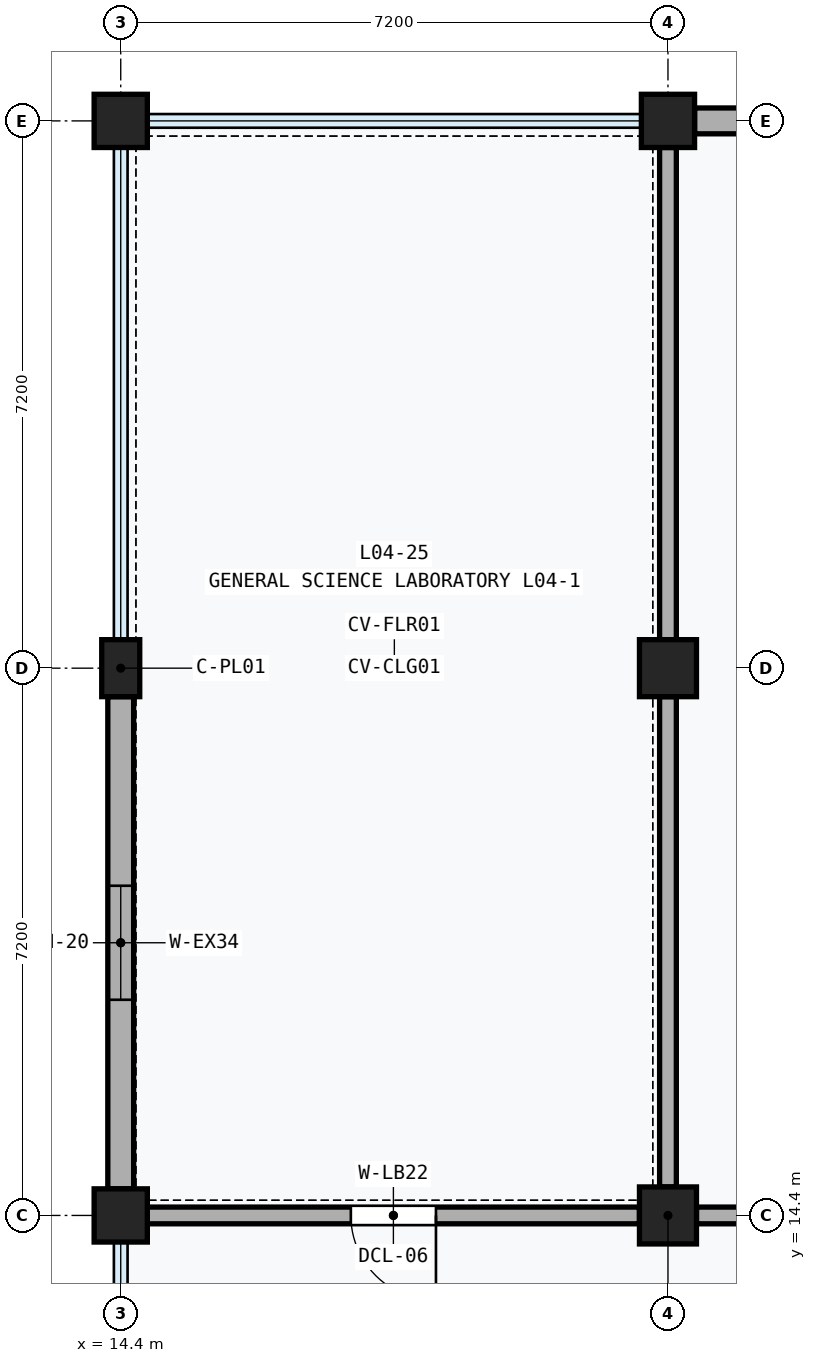
"""IFC4 building model, lengths in metres.
Left out: names, types, materials, properties, quantities, classifications, styles, units other than length and angle.
Written with IfcOpenShell. Run it as: python <this file> out.ifc"""

import sys

from ifc_helpers import new_model, si_unit, direction, frame, frame_2d, origin, origin_2d, place, context, subcontext, project, spatial, rectangle, extrude, element, fill, save


model = new_model("IFC4")
c1 = context("Model", 3, precision=1e-05, world=origin(), true_north=direction((0.0, 1.0)))
c2 = subcontext(c1, "Body", "Model", "MODEL_VIEW")
j1 = project(units=[si_unit("LENGTHUNIT", "METRE"), si_unit("PLANEANGLEUNIT", "RADIAN")], contexts=[c1])
p1 = place(None, origin())
s1 = spatial("IfcSite", under=j1, at=p1, CompositionType="ELEMENT")
p2 = place(p1, origin())
s2 = spatial("IfcBuilding", under=s1, at=p2, CompositionType="ELEMENT")
p3 = place(p2, frame((0.0, 0.0, 18.6)))
s3 = spatial("IfcBuildingStorey", under=s2, at=p3, CompositionType="ELEMENT", Elevation=18.6)
p4 = place(p3, frame((14.4, 14.4, 0.0), z_axis=(0.0, 0.0, 1.0), x_axis=(1.0, 0.0, 0.0)))
e1 = element("IfcColumn", 1, at=p4, inside=s3, PredefinedType="COLUMN", context=c2, shape_type="SweptSolid", body=[
    extrude(rectangle(XDim=0.7, YDim=0.7, at=origin_2d()), origin(), (0.0, 0.0, 1.0), 4.0),
])
p5 = place(p3, frame((14.4, 21.6, 0.0), z_axis=(0.0, 0.0, 1.0), x_axis=(1.0, 0.0, 0.0)))
e2 = element("IfcColumn", 2, at=p5, inside=s3, PredefinedType="PILASTER", context=c2, shape_type="SweptSolid", body=[
    extrude(rectangle(XDim=0.5, YDim=0.75, at=origin_2d()), origin(), (0.0, 0.0, 1.0), 4.0),
])
p6 = place(p3, frame((14.4, 28.8, 0.0), z_axis=(0.0, 0.0, 1.0), x_axis=(1.0, 0.0, 0.0)))
e3 = element("IfcColumn", 3, at=p6, inside=s3, PredefinedType="COLUMN", context=c2, shape_type="SweptSolid", body=[
    extrude(rectangle(XDim=0.7, YDim=0.7, at=origin_2d()), origin(), (0.0, 0.0, 1.0), 4.0),
])
for number, where, z_axis, x_axis in (
    (4, (21.6, 14.4, 0.0), (0.0, 0.0, 1.0), (1.0, 0.0, 0.0)),
    (5, (21.6, 21.6, 0.0), (0.0, 0.0, 1.0), (1.0, 0.0, 0.0)),
):
    element("IfcColumn", number, at=place(p3, frame(where, z_axis=z_axis, x_axis=x_axis)), inside=s3, PredefinedType="COLUMN", context=c2, shape_type="SweptSolid", body=[
        extrude(rectangle(XDim=0.75, YDim=0.75, at=origin_2d()), origin(), (0.0, 0.0, 1.0), 4.0),
    ])
p7 = place(p3, frame((21.6, 28.8, 0.0), z_axis=(0.0, 0.0, 1.0), x_axis=(1.0, 0.0, 0.0)))
e6 = element("IfcColumn", 6, at=p7, inside=s3, PredefinedType="COLUMN", context=c2, shape_type="SweptSolid", body=[
    extrude(rectangle(XDim=0.7, YDim=0.7, at=origin_2d()), origin(), (0.0, 0.0, 1.0), 4.0),
])
p8 = place(p3, frame((14.4, 14.75, 0.0), z_axis=(0.0, 0.0, 1.0), x_axis=(0.0, 1.0, 0.0)))
e7 = element("IfcWall", 7, at=p8, inside=s3, PredefinedType="SOLIDWALL", context=c2, shape_type="SweptSolid", body=[
    extrude(rectangle(XDim=6.475, YDim=0.34, at=frame_2d((3.238, 0.0))), origin(), (0.0, 0.0, 1.0), 3.11),
])
p9 = place(p8, frame((2.488, 0.0, 1.2)))
e8 = element("IfcOpeningElement", 8, at=p9, cuts=e7, PredefinedType="OPENING", context=c2, shape_type="SweptSolid", body=[
    extrude(rectangle(XDim=1.5, YDim=1.35, at=frame_2d((0.75, 0.675))), frame((0.0, 0.182, 0.0), z_axis=(0.0, -1.0, 0.0), x_axis=(1.0, 0.0, 0.0)), (0.0, 0.0, 1.0), 0.364),
])
p10 = place(p3, frame((21.95, 28.8, 0.0), z_axis=(0.0, 0.0, 1.0), x_axis=(1.0, 0.0, 0.0)))
e9 = element("IfcWall", 9, at=p10, inside=s3, PredefinedType="SOLIDWALL", context=c2, shape_type="SweptSolid", body=[
    extrude(rectangle(XDim=6.5, YDim=0.34, at=frame_2d((3.25, 0.0))), origin(), (0.0, 0.0, 1.0), 3.11),
])
p11 = place(p10, frame((2.5, 0.0, 1.1)))
e10 = element("IfcOpeningElement", 10, at=p11, cuts=e9, PredefinedType="OPENING", context=c2, shape_type="SweptSolid", body=[
    extrude(rectangle(XDim=1.5, YDim=1.35, at=frame_2d((0.75, 0.675))), frame((0.0, 0.182, 0.0), z_axis=(0.0, -1.0, 0.0), x_axis=(1.0, 0.0, 0.0)), (0.0, 0.0, 1.0), 0.364),
])
p12 = place(p3, frame((14.75, 14.4, 0.0), z_axis=(0.0, 0.0, 1.0), x_axis=(1.0, 0.0, 0.0)))
e11 = element("IfcWall", 11, at=p12, inside=s3, PredefinedType="PARTITIONING", context=c2, shape_type="SweptSolid", body=[
    extrude(rectangle(XDim=6.475, YDim=0.22, at=frame_2d((3.238, 0.0))), origin(), (0.0, 0.0, 1.0), 3.04),
])
p13 = place(p12, frame((2.677, 0.0, 0.0)))
e12 = element("IfcOpeningElement", 12, at=p13, cuts=e11, PredefinedType="OPENING", context=c2, shape_type="SweptSolid", body=[
    extrude(rectangle(XDim=1.12, YDim=2.2, at=frame_2d((0.56, 1.1))), frame((0.0, 0.122, 0.0), z_axis=(0.0, -1.0, 0.0), x_axis=(1.0, 0.0, 0.0)), (0.0, 0.0, 1.0), 0.244),
])
p14 = place(p3, frame((21.6, 14.775, 0.0), z_axis=(0.0, 0.0, 1.0), x_axis=(0.0, 1.0, 0.0)))
e13 = element("IfcWall", 13, at=p14, inside=s3, PredefinedType="PARTITIONING", context=c2, shape_type="SweptSolid", body=[
    extrude(rectangle(XDim=6.45, YDim=0.22, at=frame_2d((3.225, 0.0))), origin(), (0.0, 0.0, 1.0), 2.97),
])
p15 = place(p3, frame((21.6, 21.975, 0.0), z_axis=(0.0, 0.0, 1.0), x_axis=(0.0, 1.0, 0.0)))
e14 = element("IfcWall", 14, at=p15, inside=s3, PredefinedType="PARTITIONING", context=c2, shape_type="SweptSolid", body=[
    extrude(rectangle(XDim=6.475, YDim=0.22, at=frame_2d((3.237, 0.0))), origin(), (0.0, 0.0, 1.0), 2.97),
])
p16 = place(p3, frame((21.975, 14.4, 0.0), z_axis=(0.0, 0.0, 1.0), x_axis=(1.0, 0.0, 0.0)))
e15 = element("IfcWall", 15, at=p16, inside=s3, PredefinedType="PARTITIONING", context=c2, shape_type="SweptSolid", body=[
    extrude(rectangle(XDim=6.45, YDim=0.22, at=frame_2d((3.225, 0.0))), origin(), (0.0, 0.0, 1.0), 2.97),
])
p17 = place(p16, frame((2.645, 0.0, 0.0)))
e16 = element("IfcOpeningElement", 16, at=p17, cuts=e15, PredefinedType="OPENING", context=c2, shape_type="SweptSolid", body=[
    extrude(rectangle(XDim=1.16, YDim=2.22, at=frame_2d((0.58, 1.11))), frame((0.0, 0.122, 0.0), z_axis=(0.0, -1.0, 0.0), x_axis=(1.0, 0.0, 0.0)), (0.0, 0.0, 1.0), 0.244),
])
p18 = place(p9, origin())
e17 = element("IfcWindow", 17, at=p18, inside=s3, PartitioningType="SINGLE_PANEL", PredefinedType="WINDOW", context=c2, shape_type="SweptSolid", body=[
    extrude(rectangle(XDim=1.5, YDim=1.35, at=frame_2d((0.75, 0.675))), frame((0.0, 0.03, 0.0), z_axis=(0.0, -1.0, 0.0), x_axis=(1.0, 0.0, 0.0)), (0.0, 0.0, 1.0), 0.06),
])
fill(e8, e17)
p19 = place(p13, frame((1.12, 0.0, 0.0), z_axis=(0.0, 0.0, 1.0), x_axis=(-1.0, 0.0, 0.0)))
e18 = element("IfcDoor", 18, at=p19, inside=s3, OperationType="SINGLE_SWING_LEFT", PredefinedType="DOOR", context=c2, shape_type="SweptSolid", body=[
    extrude(rectangle(XDim=1.12, YDim=2.2, at=frame_2d((0.56, 1.1))), frame((0.0, 0.025, 0.0), z_axis=(0.0, -1.0, 0.0), x_axis=(1.0, 0.0, 0.0)), (0.0, 0.0, 1.0), 0.05),
])
fill(e12, e18)
save(model, sys.argv[1])
